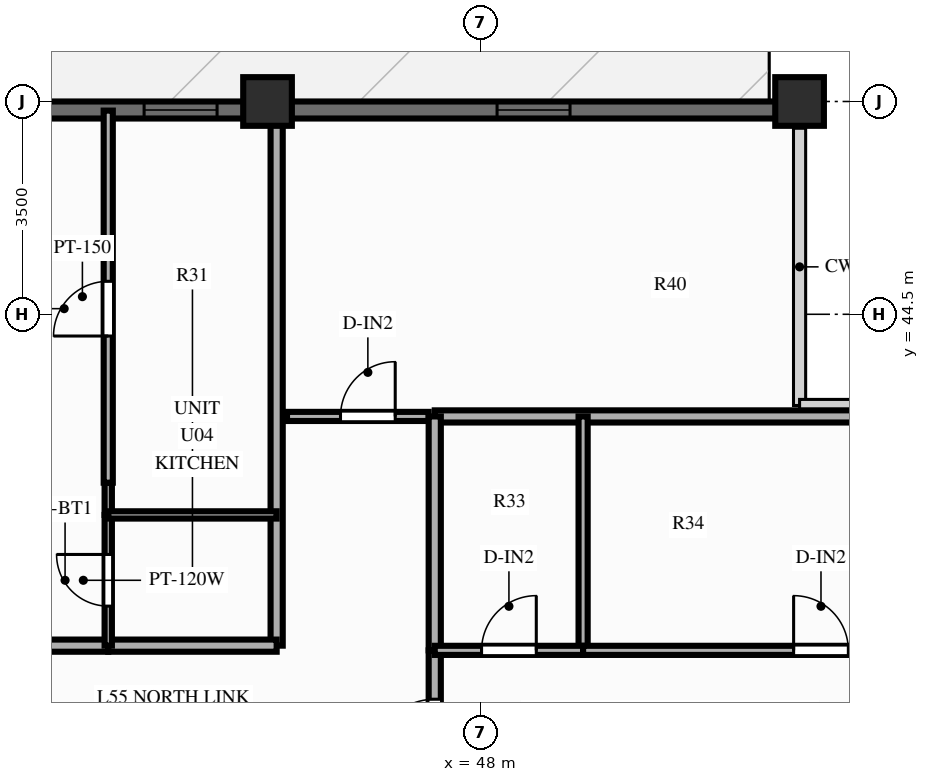
"""IFC4 building model, lengths in metres.
Left out: names, types, materials, properties, quantities, classifications, styles, units other than length and angle.
Written with IfcOpenShell. Run it as: python <this file> out.ifc"""

import sys

from ifc_helpers import new_model, si_unit, direction, frame, frame_2d, origin, origin_2d, place, context, subcontext, project, spatial, rectangle, extrude, source, transform, mapped, element, fill, save


model = new_model("IFC4")
c1 = context("Model", 3, precision=1e-05, world=origin(), true_north=direction((0.0, 1.0)))
c2 = subcontext(c1, "Body", "Model", "MODEL_VIEW")
j1 = project(units=[si_unit("LENGTHUNIT", "METRE"), si_unit("PLANEANGLEUNIT", "RADIAN")], contexts=[c1])
p1 = place(None, origin())
s1 = spatial("IfcSite", under=j1, at=p1, CompositionType="ELEMENT")
p2 = place(p1, origin())
s2 = spatial("IfcBuilding", under=s1, at=p2, CompositionType="ELEMENT")
p3 = place(p2, frame((0.0, 0.0, 176.8)))
s3 = spatial("IfcBuildingStorey", under=s2, at=p3, CompositionType="ELEMENT", Elevation=176.8)
m1 = source(origin(), c2, "Body", "SweptSolid", [
    extrude(rectangle(XDim=0.8, YDim=0.8, at=origin_2d()), origin(), (0.0, 0.0, 1.0), 3.0),
])
for number, where, z_axis, x_axis in (
    (1, (53.25, 48.0, 0.0), (0.0, 0.0, 1.0), (1.0, 0.0, 0.0)),
    (2, (44.5, 48.0, 0.0), (0.0, 0.0, 1.0), (1.0, 0.0, 0.0)),
):
    element("IfcColumn", number, at=place(p3, frame(where, z_axis=z_axis, x_axis=x_axis)), inside=s3, PredefinedType="COLUMN", context=c2, shape_type="MappedRepresentation", body=[
        mapped(m1, transform((0.0, 0.0, 0.0), scale=1.0)),
    ])
p4 = place(p3, frame((22.75, 47.86, 0.0), z_axis=(0.0, 0.0, 1.0), x_axis=(1.0, 0.0, 0.0)))
e3 = element("IfcWall", 3, at=p4, inside=s3, PredefinedType="SOLIDWALL", context=c2, shape_type="SweptSolid", body=[
    extrude(rectangle(XDim=30.5, YDim=0.28, at=frame_2d((15.25, 0.0))), origin(), (0.0, 0.0, 1.0), 2.28),
])
p5 = place(p4, frame((3.825, 0.0, 0.0)))
e4 = element("IfcOpeningElement", 4, at=p5, cuts=e3, PredefinedType="OPENING", context=c2, shape_type="SweptSolid", body=[
    extrude(rectangle(XDim=1.1, YDim=2.15, at=frame_2d((0.55, 1.075))), frame((0.0, 0.152, 0.0), z_axis=(0.0, -1.0, 0.0), x_axis=(1.0, 0.0, 0.0)), (0.0, 0.0, 1.0), 0.304),
])
p6 = place(p4, frame((9.395, 0.0, 0.25)))
e5 = element("IfcOpeningElement", 5, at=p6, cuts=e3, PredefinedType="OPENING", context=c2, shape_type="SweptSolid", body=[
    extrude(rectangle(XDim=0.95, YDim=1.5, at=frame_2d((0.475, 0.75))), frame((0.0, 0.152, 0.0), z_axis=(0.0, -1.0, 0.0), x_axis=(1.0, 0.0, 0.0)), (0.0, 0.0, 1.0), 0.304),
])
p7 = place(p4, frame((11.33, 0.0, 0.25)))
e6 = element("IfcOpeningElement", 6, at=p7, cuts=e3, PredefinedType="OPENING", context=c2, shape_type="SweptSolid", body=[
    extrude(rectangle(XDim=1.2, YDim=1.5, at=frame_2d((0.6, 0.75))), frame((0.0, 0.152, 0.0), z_axis=(0.0, -1.0, 0.0), x_axis=(1.0, 0.0, 0.0)), (0.0, 0.0, 1.0), 0.304),
])
p8 = place(p4, frame((13.894, 0.0, 0.25)))
e7 = element("IfcOpeningElement", 7, at=p8, cuts=e3, PredefinedType="OPENING", context=c2, shape_type="SweptSolid", body=[
    extrude(rectangle(XDim=1.2, YDim=1.5, at=frame_2d((0.6, 0.75))), frame((0.0, 0.152, 0.0), z_axis=(0.0, -1.0, 0.0), x_axis=(1.0, 0.0, 0.0)), (0.0, 0.0, 1.0), 0.304),
])
p9 = place(p4, frame((16.905, 0.0, 0.25)))
e8 = element("IfcOpeningElement", 8, at=p9, cuts=e3, PredefinedType="OPENING", context=c2, shape_type="SweptSolid", body=[
    extrude(rectangle(XDim=1.2, YDim=1.5, at=frame_2d((0.6, 0.75))), frame((0.0, 0.152, 0.0), z_axis=(0.0, -1.0, 0.0), x_axis=(1.0, 0.0, 0.0)), (0.0, 0.0, 1.0), 0.304),
])
p10 = place(p4, frame((19.72, 0.0, 0.25)))
e9 = element("IfcOpeningElement", 9, at=p10, cuts=e3, PredefinedType="OPENING", context=c2, shape_type="SweptSolid", body=[
    extrude(rectangle(XDim=1.2, YDim=1.5, at=frame_2d((0.6, 0.75))), frame((0.0, 0.152, 0.0), z_axis=(0.0, -1.0, 0.0), x_axis=(1.0, 0.0, 0.0)), (0.0, 0.0, 1.0), 0.304),
])
p11 = place(p4, frame((25.525, 0.0, 0.25)))
e10 = element("IfcOpeningElement", 10, at=p11, cuts=e3, PredefinedType="OPENING", context=c2, shape_type="SweptSolid", body=[
    extrude(rectangle(XDim=1.2, YDim=1.5, at=frame_2d((0.6, 0.75))), frame((0.0, 0.152, 0.0), z_axis=(0.0, -1.0, 0.0), x_axis=(1.0, 0.0, 0.0)), (0.0, 0.0, 1.0), 0.304),
])
p12 = place(p3, frame((44.82, 42.82, 0.0), z_axis=(0.0, 0.0, 1.0), x_axis=(1.0, 0.0, 0.0)))
e11 = element("IfcWall", 11, at=p12, inside=s3, PredefinedType="PARTITIONING", context=c2, shape_type="SweptSolid", body=[
    extrude(rectangle(XDim=2.33, YDim=0.15, at=frame_2d((1.165, 0.0))), origin(), (0.0, 0.0, 1.0), 2.79),
])
p13 = place(p12, frame((0.88, 0.0, 0.0)))
e12 = element("IfcOpeningElement", 12, at=p13, cuts=e11, PredefinedType="OPENING", context=c2, shape_type="SweptSolid", body=[
    extrude(rectangle(XDim=0.9, YDim=2.1, at=frame_2d((0.45, 1.05))), frame((0.0, 0.087, 0.0), z_axis=(0.0, -1.0, 0.0), x_axis=(1.0, 0.0, 0.0)), (0.0, 0.0, 1.0), 0.174),
])
p14 = place(p3, frame((44.65, 39.05, 0.0), z_axis=(0.0, 0.0, 1.0), x_axis=(0.0, 1.0, 0.0)))
e13 = element("IfcWall", 13, at=p14, inside=s3, PredefinedType="PARTITIONING", context=c2, shape_type="SweptSolid", body=[
    extrude(rectangle(XDim=8.8, YDim=0.2, at=frame_2d((4.4, 0.0))), origin(), (0.0, 0.0, 1.0), 2.39),
])
p15 = place(p3, frame((38.629, 39.05, 0.0), z_axis=(0.0, 0.0, 1.0), x_axis=(1.0, 0.0, 0.0)))
e14 = element("IfcWall", 14, at=p15, inside=s3, PredefinedType="PARTITIONING", context=c2, shape_type="SweptSolid", body=[
    extrude(rectangle(XDim=3.251, YDim=0.2, at=frame_2d((1.626, 0.0))), origin(), (0.0, 0.0, 1.0), 2.79),
])
p16 = place(p15, frame((1.126, 0.0, 0.0)))
e15 = element("IfcOpeningElement", 15, at=p16, cuts=e14, PredefinedType="OPENING", context=c2, shape_type="SweptSolid", body=[
    extrude(rectangle(XDim=1.0, YDim=2.15, at=frame_2d((0.5, 1.075))), frame((0.0, 0.112, 0.0), z_axis=(0.0, -1.0, 0.0), x_axis=(1.0, 0.0, 0.0)), (0.0, 0.0, 1.0), 0.224),
])
p17 = place(p3, frame((41.88, 39.05, 0.0), z_axis=(0.0, 0.0, 1.0), x_axis=(1.0, 0.0, 0.0)))
e16 = element("IfcWall", 16, at=p17, inside=s3, PredefinedType="PARTITIONING", context=c2, shape_type="SweptSolid", body=[
    extrude(rectangle(XDim=2.77, YDim=0.2, at=frame_2d((1.385, 0.0))), origin(), (0.0, 0.0, 1.0), 2.79),
])
p18 = place(p3, frame((41.88, 39.05, 0.0), z_axis=(0.0, 0.0, 1.0), x_axis=(0.0, 1.0, 0.0)))
e17 = element("IfcWall", 17, at=p18, inside=s3, PredefinedType="PARTITIONING", context=c2, shape_type="SweptSolid", body=[
    extrude(rectangle(XDim=2.15, YDim=0.12, at=frame_2d((1.075, 0.0))), origin(), (0.0, 0.0, 1.0), 2.79),
])
p19 = place(p18, frame((0.65, 0.0, 0.0)))
e18 = element("IfcOpeningElement", 18, at=p19, cuts=e17, PredefinedType="OPENING", context=c2, shape_type="SweptSolid", body=[
    extrude(rectangle(XDim=0.85, YDim=2.05, at=frame_2d((0.425, 1.025))), frame((0.0, 0.072, 0.0), z_axis=(0.0, -1.0, 0.0), x_axis=(1.0, 0.0, 0.0)), (0.0, 0.0, 1.0), 0.144),
])
p20 = place(p3, frame((41.88, 41.2, 0.0), z_axis=(0.0, 0.0, 1.0), x_axis=(0.0, 1.0, 0.0)))
e19 = element("IfcWall", 19, at=p20, inside=s3, PredefinedType="PARTITIONING", context=c2, shape_type="SweptSolid", body=[
    extrude(rectangle(XDim=0.53, YDim=0.12, at=frame_2d((0.265, 0.0))), origin(), (0.0, 0.0, 1.0), 2.79),
])
p21 = place(p3, frame((41.88, 41.2, 0.0), z_axis=(0.0, 0.0, 1.0), x_axis=(1.0, 0.0, 0.0)))
e20 = element("IfcWall", 20, at=p21, inside=s3, PredefinedType="PARTITIONING", context=c2, shape_type="SweptSolid", body=[
    extrude(rectangle(XDim=2.77, YDim=0.12, at=frame_2d((1.385, 0.0))), origin(), (0.0, 0.0, 1.0), 2.79),
])
p22 = place(p3, frame((41.88, 41.73, 0.0), z_axis=(0.0, 0.0, 1.0), x_axis=(0.0, 1.0, 0.0)))
e21 = element("IfcWall", 21, at=p22, inside=s3, PredefinedType="PARTITIONING", context=c2, shape_type="SweptSolid", body=[
    extrude(rectangle(XDim=6.12, YDim=0.15, at=frame_2d((3.06, 0.0))), origin(), (0.0, 0.0, 1.0), 2.79),
])
p23 = place(p22, frame((2.413, 0.0, 0.0)))
e22 = element("IfcOpeningElement", 22, at=p23, cuts=e21, PredefinedType="OPENING", context=c2, shape_type="SweptSolid", body=[
    extrude(rectangle(XDim=0.9, YDim=2.1, at=frame_2d((0.45, 1.05))), frame((0.0, 0.087, 0.0), z_axis=(0.0, -1.0, 0.0), x_axis=(1.0, 0.0, 0.0)), (0.0, 0.0, 1.0), 0.174),
])
p24 = place(p3, frame((47.25, 42.82, 0.0), z_axis=(0.0, 0.0, 1.0), x_axis=(1.0, 0.0, 0.0)))
e23 = element("IfcWall", 23, at=p24, inside=s3, PredefinedType="PARTITIONING", context=c2, shape_type="SweptSolid", body=[
    extrude(rectangle(XDim=10.85, YDim=0.2, at=frame_2d((5.425, 0.0))), origin(), (0.0, 0.0, 1.0), 2.79),
])
p25 = place(p3, frame((47.25, 35.445, 0.0), z_axis=(0.0, 0.0, 1.0), x_axis=(0.0, 1.0, 0.0)))
e24 = element("IfcWall", 24, at=p25, inside=s3, PredefinedType="PARTITIONING", context=c2, shape_type="SweptSolid", body=[
    extrude(rectangle(XDim=3.527, YDim=0.2, at=frame_2d((1.764, 0.0))), origin(), (0.0, 0.0, 1.0), 2.79),
])
p26 = place(p25, frame((1.724, 0.0, 0.0)))
e25 = element("IfcOpeningElement", 25, at=p26, cuts=e24, PredefinedType="OPENING", context=c2, shape_type="SweptSolid", body=[
    extrude(rectangle(XDim=1.0, YDim=2.15, at=frame_2d((0.5, 1.075))), frame((0.0, 0.112, 0.0), z_axis=(0.0, -1.0, 0.0), x_axis=(1.0, 0.0, 0.0)), (0.0, 0.0, 1.0), 0.224),
])
p27 = place(p3, frame((47.25, 38.973, 0.0), z_axis=(0.0, 0.0, 1.0), x_axis=(0.0, 1.0, 0.0)))
e26 = element("IfcWall", 26, at=p27, inside=s3, PredefinedType="PARTITIONING", context=c2, shape_type="SweptSolid", body=[
    extrude(rectangle(XDim=3.847, YDim=0.2, at=frame_2d((1.924, 0.0))), origin(), (0.0, 0.0, 1.0), 2.79),
])
p28 = place(p3, frame((49.69, 38.973, 0.0), z_axis=(0.0, 0.0, 1.0), x_axis=(0.0, 1.0, 0.0)))
e27 = element("IfcWall", 27, at=p28, inside=s3, PredefinedType="PARTITIONING", context=c2, shape_type="SweptSolid", body=[
    extrude(rectangle(XDim=3.847, YDim=0.15, at=frame_2d((1.924, 0.0))), origin(), (0.0, 0.0, 1.0), 2.79),
])
p29 = place(p3, frame((47.25, 38.973, 0.0), z_axis=(0.0, 0.0, 1.0), x_axis=(1.0, 0.0, 0.0)))
e28 = element("IfcWall", 28, at=p29, inside=s3, PredefinedType="PARTITIONING", context=c2, shape_type="SweptSolid", body=[
    extrude(rectangle(XDim=2.44, YDim=0.15, at=frame_2d((1.22, 0.0))), origin(), (0.0, 0.0, 1.0), 2.79),
])
p30 = place(p29, frame((0.77, 0.0, 0.0)))
e29 = element("IfcOpeningElement", 29, at=p30, cuts=e28, PredefinedType="OPENING", context=c2, shape_type="SweptSolid", body=[
    extrude(rectangle(XDim=0.9, YDim=2.1, at=frame_2d((0.45, 1.05))), frame((0.0, 0.087, 0.0), z_axis=(0.0, -1.0, 0.0), x_axis=(1.0, 0.0, 0.0)), (0.0, 0.0, 1.0), 0.174),
])
p31 = place(p3, frame((49.69, 38.973, 0.0), z_axis=(0.0, 0.0, 1.0), x_axis=(1.0, 0.0, 0.0)))
e30 = element("IfcWall", 30, at=p31, inside=s3, PredefinedType="PARTITIONING", context=c2, shape_type="SweptSolid", body=[
    extrude(rectangle(XDim=8.41, YDim=0.15, at=frame_2d((4.205, 0.0))), origin(), (0.0, 0.0, 1.0), 2.79),
])
p32 = place(p31, frame((3.462, 0.0, 0.0)))
e31 = element("IfcOpeningElement", 31, at=p32, cuts=e30, PredefinedType="OPENING", context=c2, shape_type="SweptSolid", body=[
    extrude(rectangle(XDim=0.9, YDim=2.1, at=frame_2d((0.45, 1.05))), frame((0.0, 0.087, 0.0), z_axis=(0.0, -1.0, 0.0), x_axis=(1.0, 0.0, 0.0)), (0.0, 0.0, 1.0), 0.174),
])
m2 = source(origin(), c2, "Body", "SweptSolid", [
    extrude(rectangle(XDim=1.2, YDim=1.5, at=frame_2d((0.6, 0.75))), frame((0.0, 0.03, 0.0), z_axis=(0.0, -1.0, 0.0), x_axis=(1.0, 0.0, 0.0)), (0.0, 0.0, 1.0), 0.06),
])
p33 = place(p10, origin())
e32 = element("IfcWindow", 32, at=p33, inside=s3, PartitioningType="SINGLE_PANEL", PredefinedType="WINDOW", context=c2, shape_type="MappedRepresentation", body=[
    mapped(m2, transform((0.0, 0.0, 0.0), scale=1.0)),
])
fill(e9, e32)
p34 = place(p11, origin())
e33 = element("IfcWindow", 33, at=p34, inside=s3, PartitioningType="SINGLE_PANEL", PredefinedType="WINDOW", context=c2, shape_type="MappedRepresentation", body=[
    mapped(m2, transform((0.0, 0.0, 0.0), scale=1.0)),
])
fill(e10, e33)
m3 = source(origin(), c2, "Body", "SweptSolid", [
    extrude(rectangle(XDim=0.9, YDim=2.1, at=frame_2d((0.45, 1.05))), frame((0.0, 0.025, 0.0), z_axis=(0.0, -1.0, 0.0), x_axis=(1.0, 0.0, 0.0)), (0.0, 0.0, 1.0), 0.05),
])
p35 = place(p13, origin())
e34 = element("IfcDoor", 34, at=p35, inside=s3, OperationType="SINGLE_SWING_RIGHT", PredefinedType="DOOR", context=c2, shape_type="MappedRepresentation", body=[
    mapped(m3, transform((0.0, 0.0, 0.0), scale=1.0)),
])
fill(e12, e34)
m4 = source(origin(), c2, "Body", "SweptSolid", [
    extrude(rectangle(XDim=0.85, YDim=2.05, at=frame_2d((0.425, 1.025))), frame((0.0, 0.025, 0.0), z_axis=(0.0, -1.0, 0.0), x_axis=(1.0, 0.0, 0.0)), (0.0, 0.0, 1.0), 0.05),
])
p36 = place(p19, origin())
e35 = element("IfcDoor", 35, at=p36, inside=s3, OperationType="SINGLE_SWING_RIGHT", PredefinedType="DOOR", context=c2, shape_type="MappedRepresentation", body=[
    mapped(m4, transform((0.0, 0.0, 0.0), scale=1.0)),
])
fill(e18, e35)
p37 = place(p23, origin())
e36 = element("IfcDoor", 36, at=p37, inside=s3, OperationType="SINGLE_SWING_LEFT", PredefinedType="DOOR", context=c2, shape_type="MappedRepresentation", body=[
    mapped(m3, transform((0.0, 0.0, 0.0), scale=1.0)),
])
fill(e22, e36)
m5 = source(origin(), c2, "Body", "SweptSolid", [
    extrude(rectangle(XDim=1.0, YDim=2.15, at=frame_2d((0.5, 1.075))), frame((0.0, 0.025, 0.0), z_axis=(0.0, -1.0, 0.0), x_axis=(1.0, 0.0, 0.0)), (0.0, 0.0, 1.0), 0.05),
])
p38 = place(p26, origin())
e37 = element("IfcDoor", 37, at=p38, inside=s3, OperationType="SINGLE_SWING_LEFT", PredefinedType="DOOR", context=c2, shape_type="MappedRepresentation", body=[
    mapped(m5, transform((0.0, 0.0, 0.0), scale=1.0)),
])
fill(e25, e37)
p39 = place(p30, origin())
e38 = element("IfcDoor", 38, at=p39, inside=s3, OperationType="SINGLE_SWING_RIGHT", PredefinedType="DOOR", context=c2, shape_type="MappedRepresentation", body=[
    mapped(m3, transform((0.0, 0.0, 0.0), scale=1.0)),
])
fill(e29, e38)
p40 = place(p32, origin())
e39 = element("IfcDoor", 39, at=p40, inside=s3, OperationType="SINGLE_SWING_LEFT", PredefinedType="DOOR", context=c2, shape_type="MappedRepresentation", body=[
    mapped(m3, transform((0.0, 0.0, 0.0), scale=1.0)),
])
fill(e31, e39)
save(model, sys.argv[1])
